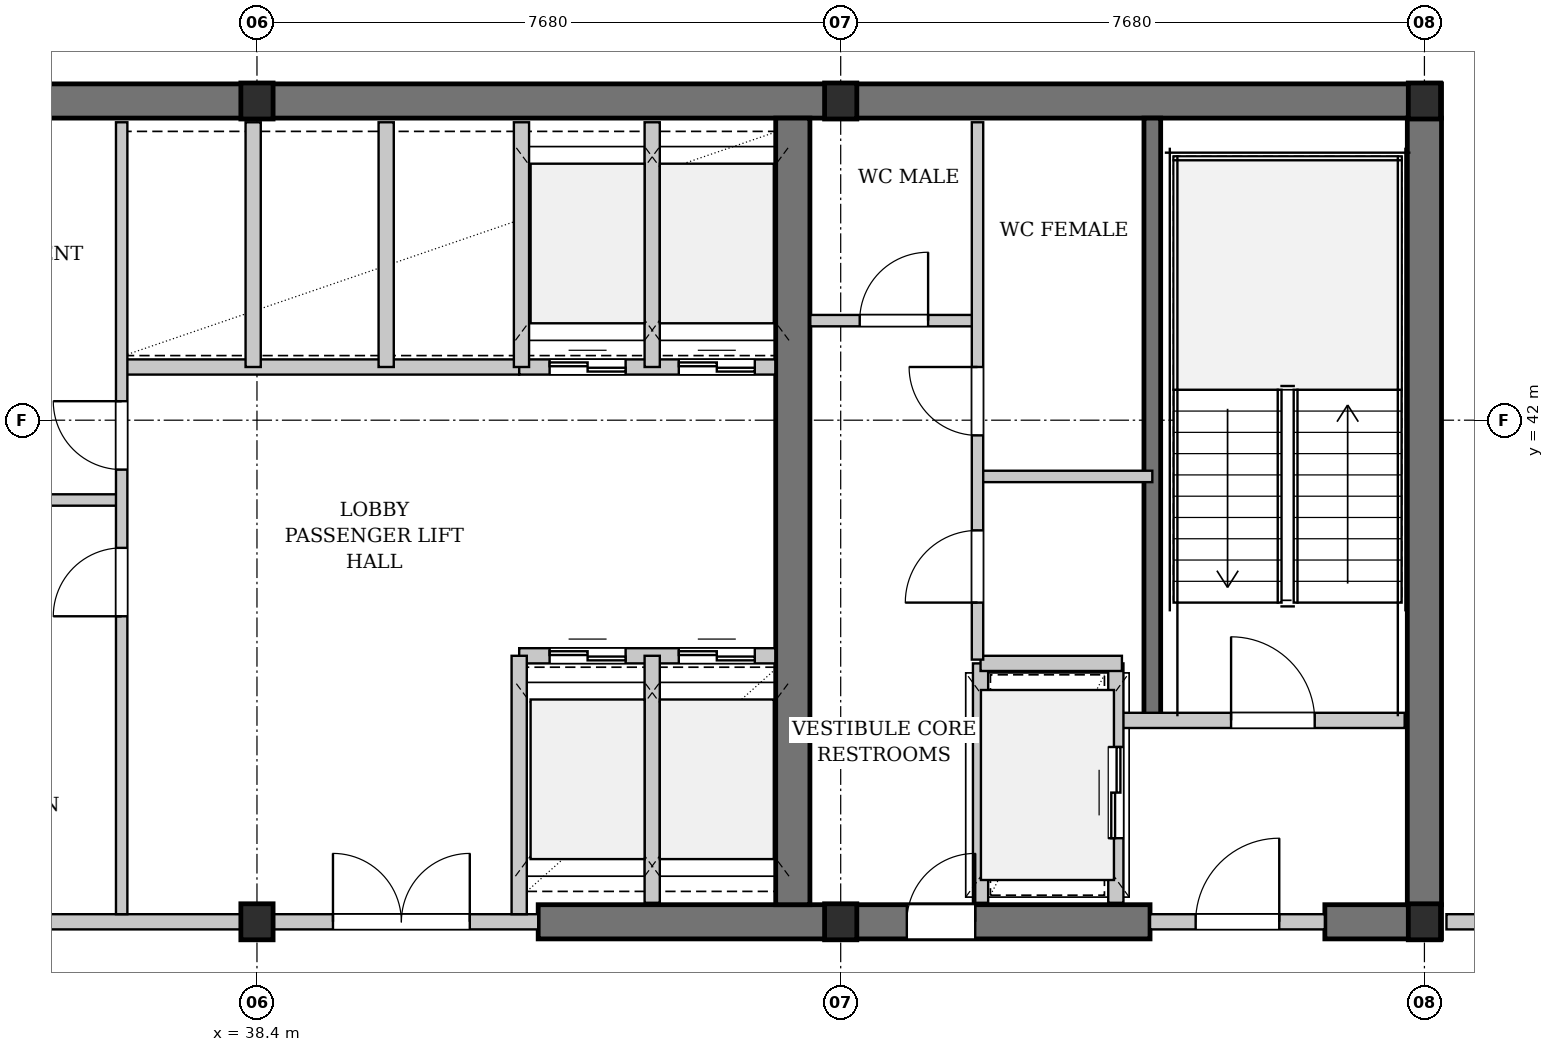
"""IFC4 building model, lengths in metres.
Left out: names, types, materials, properties, quantities, classifications, styles, units other than length and angle.
Written with IfcOpenShell. Run it as: python <this file> out.ifc"""

import sys

from ifc_helpers import new_model, si_unit, direction, frame, frame_2d, origin, origin_2d, place, context, subcontext, project, spatial, rectangle, i_section, extrude, element, fill, save


model = new_model("IFC4")
c1 = context("Model", 3, precision=1e-05, world=origin(), true_north=direction((0.0, 1.0)))
c2 = subcontext(c1, "Body", "Model", "MODEL_VIEW")
j1 = project(units=[si_unit("LENGTHUNIT", "METRE"), si_unit("PLANEANGLEUNIT", "RADIAN")], contexts=[c1])
p1 = place(None, origin())
s1 = spatial("IfcSite", under=j1, at=p1, CompositionType="ELEMENT")
p2 = place(p1, origin())
s2 = spatial("IfcBuilding", under=s1, at=p2, CompositionType="ELEMENT")
p3 = place(p2, frame((0.0, 0.0, 137.3)))
s3 = spatial("IfcBuildingStorey", under=s2, at=p3, CompositionType="ELEMENT", Elevation=137.3)
p4 = place(p3, frame((22.815, 46.2, 0.0), z_axis=(0.0, 0.0, 1.0), x_axis=(1.0, 0.0, 0.0)))
e1 = element("IfcWall", 1, at=p4, inside=s3, PredefinedType="SHEAR", context=c2, shape_type="SweptSolid", body=[
    extrude(rectangle(XDim=31.17, YDim=0.45, at=frame_2d((15.585, 0.0))), origin(), (0.0, 0.0, 1.0), 3.68),
])
p5 = place(p3, frame((42.1, 35.4, 0.0), z_axis=(0.0, 0.0, 1.0), x_axis=(1.0, 0.0, 0.0)))
e2 = element("IfcWall", 2, at=p5, inside=s3, PredefinedType="SHEAR", context=c2, shape_type="SweptSolid", body=[
    extrude(rectangle(XDim=8.05, YDim=0.45, at=frame_2d((4.025, 0.0))), origin(), (0.0, 0.0, 1.0), 3.68),
])
p6 = place(p5, frame((4.85, 0.0, 0.0)))
e3 = element("IfcOpeningElement", 3, at=p6, cuts=e2, PredefinedType="OPENING", context=c2, shape_type="SweptSolid", body=[
    extrude(rectangle(XDim=0.9, YDim=2.15, at=frame_2d((0.45, 1.075))), frame((0.0, 0.235, 0.0), z_axis=(0.0, -1.0, 0.0), x_axis=(1.0, 0.0, 0.0)), (0.0, 0.0, 1.0), 0.47),
])
p7 = place(p3, frame((52.45, 35.4, 0.0), z_axis=(0.0, 0.0, 1.0), x_axis=(1.0, 0.0, 0.0)))
e4 = element("IfcWall", 4, at=p7, inside=s3, PredefinedType="SHEAR", context=c2, shape_type="SweptSolid", body=[
    extrude(rectangle(XDim=1.535, YDim=0.45, at=frame_2d((0.768, 0.0))), origin(), (0.0, 0.0, 1.0), 3.68),
])
for number, where, z_axis, x_axis in (
    (5, (45.45, 35.625, 0.0), (0.0, 0.0, 1.0), (0.0, 1.0, 0.0)),
    (6, (53.76, 35.625, 0.0), (0.0, 0.0, 1.0), (0.0, 1.0, 0.0)),
):
    element("IfcWall", number, at=place(p3, frame(where, z_axis=z_axis, x_axis=x_axis)), inside=s3, PredefinedType="SHEAR", context=c2, shape_type="SweptSolid", body=[
        extrude(rectangle(XDim=10.35, YDim=0.45, at=frame_2d((5.175, 0.0))), origin(), (0.0, 0.0, 1.0), 3.68),
    ])
p8 = place(p3, frame((50.18, 38.05, 0.0), z_axis=(0.0, 0.0, 1.0), x_axis=(0.0, 1.0, 0.0)))
e7 = element("IfcWall", 7, at=p8, inside=s3, PredefinedType="SHEAR", context=c2, shape_type="SweptSolid", body=[
    extrude(rectangle(XDim=7.925, YDim=0.22, at=frame_2d((3.962, 0.0))), origin(), (0.0, 0.0, 1.0), 3.68),
])
for number, where, z_axis, x_axis in (
    (8, (38.4, 35.4, 0.0), (0.0, 0.0, 1.0), (1.0, 0.0, 0.0)),
    (9, (38.4, 46.2, 0.0), (0.0, 0.0, 1.0), (1.0, 0.0, 0.0)),
    (10, (46.08, 35.4, 0.0), (0.0, 0.0, 1.0), (1.0, 0.0, 0.0)),
    (11, (46.08, 46.2, 0.0), (0.0, 0.0, 1.0), (1.0, 0.0, 0.0)),
    (12, (53.76, 35.4, 0.0), (0.0, 0.0, 1.0), (1.0, 0.0, 0.0)),
    (13, (53.76, 46.2, 0.0), (0.0, 0.0, 1.0), (1.0, 0.0, 0.0)),
):
    element("IfcColumn", number, at=place(p3, frame(where, z_axis=z_axis, x_axis=x_axis)), inside=s3, PredefinedType="COLUMN", context=c2, shape_type="SweptSolid", body=[
        extrude(i_section(OverallWidth=0.424, OverallDepth=0.474, WebThickness=0.047, FlangeThickness=0.077, FilletRadius=0.015, at=origin_2d()), origin(), (0.0, 0.0, 1.0), 3.9),
    ])
p9 = place(p3, frame((35.6, 35.4, 0.0), z_axis=(0.0, 0.0, 1.0), x_axis=(1.0, 0.0, 0.0)))
e14 = element("IfcWall", 14, at=p9, inside=s3, PredefinedType="PARTITIONING", context=c2, shape_type="SweptSolid", body=[
    extrude(rectangle(XDim=6.5, YDim=0.2, at=frame_2d((3.25, 0.0))), origin(), (0.0, 0.0, 1.0), 2.765),
])
p10 = place(p9, frame((3.8, 0.0, 0.0)))
e15 = element("IfcOpeningElement", 15, at=p10, cuts=e14, PredefinedType="OPENING", context=c2, shape_type="SweptSolid", body=[
    extrude(rectangle(XDim=1.8, YDim=2.3, at=frame_2d((0.9, 1.15))), frame((0.0, 0.11, 0.0), z_axis=(0.0, -1.0, 0.0), x_axis=(1.0, 0.0, 0.0)), (0.0, 0.0, 1.0), 0.22),
])
p11 = place(p3, frame((36.6, 42.7, 0.0), z_axis=(0.0, 0.0, 1.0), x_axis=(1.0, 0.0, 0.0)))
e16 = element("IfcWall", 16, at=p11, inside=s3, PredefinedType="PARTITIONING", context=c2, shape_type="SweptSolid", body=[
    extrude(rectangle(XDim=5.25, YDim=0.2, at=frame_2d((2.625, 0.0))), origin(), (0.0, 0.0, 1.0), 3.68),
])
p12 = place(p3, frame((38.35, 42.7, 0.0), z_axis=(0.0, 0.0, 1.0), x_axis=(0.0, 1.0, 0.0)))
e17 = element("IfcWall", 17, at=p12, inside=s3, PredefinedType="PARTITIONING", context=c2, shape_type="SweptSolid", body=[
    extrude(rectangle(XDim=3.22, YDim=0.2, at=frame_2d((1.61, 0.0))), origin(), (0.0, 0.0, 1.0), 2.765),
])
p13 = place(p3, frame((40.1, 42.7, 0.0), z_axis=(0.0, 0.0, 1.0), x_axis=(0.0, 1.0, 0.0)))
e18 = element("IfcWall", 18, at=p13, inside=s3, PredefinedType="PARTITIONING", context=c2, shape_type="SweptSolid", body=[
    extrude(rectangle(XDim=3.22, YDim=0.2, at=frame_2d((1.61, 0.0))), origin(), (0.0, 0.0, 1.0), 3.68),
])
p14 = place(p3, frame((33.05, 40.95, 0.0), z_axis=(0.0, 0.0, 1.0), x_axis=(1.0, 0.0, 0.0)))
e19 = element("IfcWall", 19, at=p14, inside=s3, PredefinedType="PARTITIONING", context=c2, shape_type="SweptSolid", body=[
    extrude(rectangle(XDim=3.57, YDim=0.15, at=frame_2d((1.785, 0.0))), origin(), (0.0, 0.0, 1.0), 3.68),
])
p15 = place(p3, frame((36.62, 35.5, 0.0), z_axis=(0.0, 0.0, 1.0), x_axis=(0.0, 1.0, 0.0)))
e20 = element("IfcWall", 20, at=p15, inside=s3, PredefinedType="PARTITIONING", context=c2, shape_type="SweptSolid", body=[
    extrude(rectangle(XDim=10.42, YDim=0.15, at=frame_2d((5.21, 0.0))), origin(), (0.0, 0.0, 1.0), 3.68),
])
p16 = place(p15, frame((3.92, 0.0, 0.0)))
e21 = element("IfcOpeningElement", 21, at=p16, cuts=e20, PredefinedType="OPENING", context=c2, shape_type="SweptSolid", body=[
    extrude(rectangle(XDim=0.9, YDim=2.15, at=frame_2d((0.45, 1.075))), frame((0.0, 0.085, 0.0), z_axis=(0.0, -1.0, 0.0), x_axis=(1.0, 0.0, 0.0)), (0.0, 0.0, 1.0), 0.17),
])
p17 = place(p15, frame((5.85, 0.0, 0.0)))
e22 = element("IfcOpeningElement", 22, at=p17, cuts=e20, PredefinedType="OPENING", context=c2, shape_type="SweptSolid", body=[
    extrude(rectangle(XDim=0.9, YDim=2.15, at=frame_2d((0.45, 1.075))), frame((0.0, 0.085, 0.0), z_axis=(0.0, -1.0, 0.0), x_axis=(1.0, 0.0, 0.0)), (0.0, 0.0, 1.0), 0.17),
])
p18 = place(p3, frame((41.85, 38.9, 0.0), z_axis=(0.0, 0.0, 1.0), x_axis=(1.0, 0.0, 0.0)))
e23 = element("IfcWall", 23, at=p18, inside=s3, PredefinedType="PARTITIONING", context=c2, shape_type="SweptSolid", body=[
    extrude(rectangle(XDim=3.37, YDim=0.2, at=frame_2d((1.685, 0.0))), origin(), (0.0, 0.0, 1.0), 3.68),
])
p19 = place(p18, frame((0.4, 0.0, 0.0)))
e24 = element("IfcOpeningElement", 24, at=p19, cuts=e23, PredefinedType="OPENING", context=c2, shape_type="SweptSolid", body=[
    extrude(rectangle(XDim=1.0, YDim=2.2, at=frame_2d((0.5, 1.1))), frame((0.0, 0.11, 0.0), z_axis=(0.0, -1.0, 0.0), x_axis=(1.0, 0.0, 0.0)), (0.0, 0.0, 1.0), 0.22),
])
p20 = place(p18, frame((2.1, 0.0, 0.0)))
e25 = element("IfcOpeningElement", 25, at=p20, cuts=e23, PredefinedType="OPENING", context=c2, shape_type="SweptSolid", body=[
    extrude(rectangle(XDim=1.0, YDim=2.2, at=frame_2d((0.5, 1.1))), frame((0.0, 0.11, 0.0), z_axis=(0.0, -1.0, 0.0), x_axis=(1.0, 0.0, 0.0)), (0.0, 0.0, 1.0), 0.22),
])
p21 = place(p3, frame((41.85, 42.7, 0.0), z_axis=(0.0, 0.0, 1.0), x_axis=(1.0, 0.0, 0.0)))
e26 = element("IfcWall", 26, at=p21, inside=s3, PredefinedType="PARTITIONING", context=c2, shape_type="SweptSolid", body=[
    extrude(rectangle(XDim=3.37, YDim=0.2, at=frame_2d((1.685, 0.0))), origin(), (0.0, 0.0, 1.0), 3.68),
])
p22 = place(p21, frame((0.4, 0.0, 0.0)))
e27 = element("IfcOpeningElement", 27, at=p22, cuts=e26, PredefinedType="OPENING", context=c2, shape_type="SweptSolid", body=[
    extrude(rectangle(XDim=1.0, YDim=2.2, at=frame_2d((0.5, 1.1))), frame((0.0, 0.11, 0.0), z_axis=(0.0, -1.0, 0.0), x_axis=(1.0, 0.0, 0.0)), (0.0, 0.0, 1.0), 0.22),
])
p23 = place(p21, frame((2.1, 0.0, 0.0)))
e28 = element("IfcOpeningElement", 28, at=p23, cuts=e26, PredefinedType="OPENING", context=c2, shape_type="SweptSolid", body=[
    extrude(rectangle(XDim=1.0, YDim=2.2, at=frame_2d((0.5, 1.1))), frame((0.0, 0.11, 0.0), z_axis=(0.0, -1.0, 0.0), x_axis=(1.0, 0.0, 0.0)), (0.0, 0.0, 1.0), 0.22),
])
p24 = place(p3, frame((43.6, 35.65, 0.0), z_axis=(0.0, 0.0, 1.0), x_axis=(0.0, 1.0, 0.0)))
e29 = element("IfcWall", 29, at=p24, inside=s3, PredefinedType="PARTITIONING", context=c2, shape_type="SweptSolid", body=[
    extrude(rectangle(XDim=3.25, YDim=0.2, at=frame_2d((1.625, 0.0))), origin(), (0.0, 0.0, 1.0), 3.68),
])
p25 = place(p3, frame((43.6, 42.7, 0.0), z_axis=(0.0, 0.0, 1.0), x_axis=(0.0, 1.0, 0.0)))
e30 = element("IfcWall", 30, at=p25, inside=s3, PredefinedType="PARTITIONING", context=c2, shape_type="SweptSolid", body=[
    extrude(rectangle(XDim=3.22, YDim=0.2, at=frame_2d((1.61, 0.0))), origin(), (0.0, 0.0, 1.0), 3.68),
])
p26 = place(p3, frame((41.85, 35.5, 0.0), z_axis=(0.0, 0.0, 1.0), x_axis=(0.0, 1.0, 0.0)))
e31 = element("IfcWall", 31, at=p26, inside=s3, PredefinedType="PARTITIONING", context=c2, shape_type="SweptSolid", body=[
    extrude(rectangle(XDim=3.4, YDim=0.2, at=frame_2d((1.7, 0.0))), origin(), (0.0, 0.0, 1.0), 3.68),
])
p27 = place(p3, frame((41.88, 42.7, 0.0), z_axis=(0.0, 0.0, 1.0), x_axis=(0.0, 1.0, 0.0)))
e32 = element("IfcWall", 32, at=p27, inside=s3, PredefinedType="PARTITIONING", context=c2, shape_type="SweptSolid", body=[
    extrude(rectangle(XDim=3.22, YDim=0.2, at=frame_2d((1.61, 0.0))), origin(), (0.0, 0.0, 1.0), 3.68),
])
p28 = place(p3, frame((49.78, 38.05, 0.0), z_axis=(0.0, 0.0, 1.0), x_axis=(1.0, 0.0, 0.0)))
e33 = element("IfcWall", 33, at=p28, inside=s3, PredefinedType="PARTITIONING", context=c2, shape_type="SweptSolid", body=[
    extrude(rectangle(XDim=3.72, YDim=0.2, at=frame_2d((1.86, 0.0))), origin(), (0.0, 0.0, 1.0), 3.68),
])
p29 = place(p28, frame((1.436, 0.0, 0.0)))
e34 = element("IfcOpeningElement", 34, at=p29, cuts=e33, PredefinedType="OPENING", context=c2, shape_type="SweptSolid", body=[
    extrude(rectangle(XDim=1.1, YDim=2.15, at=frame_2d((0.55, 1.075))), frame((0.0, 0.11, 0.0), z_axis=(0.0, -1.0, 0.0), x_axis=(1.0, 0.0, 0.0)), (0.0, 0.0, 1.0), 0.22),
])
p30 = place(p3, frame((50.15, 35.4, 0.0), z_axis=(0.0, 0.0, 1.0), x_axis=(1.0, 0.0, 0.0)))
e35 = element("IfcWall", 35, at=p30, inside=s3, PredefinedType="PARTITIONING", context=c2, shape_type="SweptSolid", body=[
    extrude(rectangle(XDim=2.3, YDim=0.2, at=frame_2d((1.15, 0.0))), origin(), (0.0, 0.0, 1.0), 2.765),
])
p31 = place(p30, frame((0.6, 0.0, 0.0)))
e36 = element("IfcOpeningElement", 36, at=p31, cuts=e35, PredefinedType="OPENING", context=c2, shape_type="SweptSolid", body=[
    extrude(rectangle(XDim=1.1, YDim=2.15, at=frame_2d((0.55, 1.075))), frame((0.0, 0.11, 0.0), z_axis=(0.0, -1.0, 0.0), x_axis=(1.0, 0.0, 0.0)), (0.0, 0.0, 1.0), 0.22),
])
p32 = place(p3, frame((49.7, 35.65, 0.0), z_axis=(0.0, 0.0, 1.0), x_axis=(0.0, 1.0, 0.0)))
e37 = element("IfcWall", 37, at=p32, inside=s3, PredefinedType="PARTITIONING", context=c2, shape_type="SweptSolid", body=[
    extrude(rectangle(XDim=3.15, YDim=0.2, at=frame_2d((1.575, 0.0))), origin(), (0.0, 0.0, 1.0), 3.68),
])
p33 = place(p32, frame((0.85, 0.0, 0.0)))
e38 = element("IfcOpeningElement", 38, at=p33, cuts=e37, PredefinedType="OPENING", context=c2, shape_type="SweptSolid", body=[
    extrude(rectangle(XDim=1.2, YDim=2.2, at=frame_2d((0.6, 1.1))), frame((0.0, 0.11, 0.0), z_axis=(0.0, -1.0, 0.0), x_axis=(1.0, 0.0, 0.0)), (0.0, 0.0, 1.0), 0.22),
])
p34 = place(p3, frame((47.92, 35.65, 0.0), z_axis=(0.0, 0.0, 1.0), x_axis=(0.0, 1.0, 0.0)))
e39 = element("IfcWall", 39, at=p34, inside=s3, PredefinedType="PARTITIONING", context=c2, shape_type="SweptSolid", body=[
    extrude(rectangle(XDim=3.15, YDim=0.2, at=frame_2d((1.575, 0.0))), origin(), (0.0, 0.0, 1.0), 3.68),
])
p35 = place(p3, frame((47.92, 38.8, 0.0), z_axis=(0.0, 0.0, 1.0), x_axis=(1.0, 0.0, 0.0)))
e40 = element("IfcWall", 40, at=p35, inside=s3, PredefinedType="PARTITIONING", context=c2, shape_type="SweptSolid", body=[
    extrude(rectangle(XDim=1.86, YDim=0.2, at=frame_2d((0.93, 0.0))), origin(), (0.0, 0.0, 1.0), 3.68),
])
p36 = place(p3, frame((45.68, 43.31, 0.0), z_axis=(0.0, 0.0, 1.0), x_axis=(1.0, 0.0, 0.0)))
e41 = element("IfcWall", 41, at=p36, inside=s3, PredefinedType="PARTITIONING", context=c2, shape_type="SweptSolid", body=[
    extrude(rectangle(XDim=2.2, YDim=0.15, at=frame_2d((1.1, 0.0))), origin(), (0.0, 0.0, 1.0), 3.68),
])
p37 = place(p36, frame((0.65, 0.0, 0.0)))
e42 = element("IfcOpeningElement", 42, at=p37, cuts=e41, PredefinedType="OPENING", context=c2, shape_type="SweptSolid", body=[
    extrude(rectangle(XDim=0.9, YDim=2.15, at=frame_2d((0.45, 1.075))), frame((0.0, 0.085, 0.0), z_axis=(0.0, -1.0, 0.0), x_axis=(1.0, 0.0, 0.0)), (0.0, 0.0, 1.0), 0.17),
])
p38 = place(p3, frame((47.88, 41.26, 0.0), z_axis=(0.0, 0.0, 1.0), x_axis=(1.0, 0.0, 0.0)))
e43 = element("IfcWall", 43, at=p38, inside=s3, PredefinedType="PARTITIONING", context=c2, shape_type="SweptSolid", body=[
    extrude(rectangle(XDim=2.3, YDim=0.15, at=frame_2d((1.15, 0.0))), origin(), (0.0, 0.0, 1.0), 3.68),
])
p39 = place(p3, frame((47.88, 38.85, 0.0), z_axis=(0.0, 0.0, 1.0), x_axis=(0.0, 1.0, 0.0)))
e44 = element("IfcWall", 44, at=p39, inside=s3, PredefinedType="PARTITIONING", context=c2, shape_type="SweptSolid", body=[
    extrude(rectangle(XDim=7.07, YDim=0.15, at=frame_2d((3.535, 0.0))), origin(), (0.0, 0.0, 1.0), 3.68),
])
p40 = place(p39, frame((0.75, 0.0, 0.0)))
e45 = element("IfcOpeningElement", 45, at=p40, cuts=e44, PredefinedType="OPENING", context=c2, shape_type="SweptSolid", body=[
    extrude(rectangle(XDim=0.95, YDim=2.15, at=frame_2d((0.475, 1.075))), frame((0.0, 0.085, 0.0), z_axis=(0.0, -1.0, 0.0), x_axis=(1.0, 0.0, 0.0)), (0.0, 0.0, 1.0), 0.17),
])
p41 = place(p39, frame((2.95, 0.0, 0.0)))
e46 = element("IfcOpeningElement", 46, at=p41, cuts=e44, PredefinedType="OPENING", context=c2, shape_type="SweptSolid", body=[
    extrude(rectangle(XDim=0.9, YDim=2.15, at=frame_2d((0.45, 1.075))), frame((0.0, 0.085, 0.0), z_axis=(0.0, -1.0, 0.0), x_axis=(1.0, 0.0, 0.0)), (0.0, 0.0, 1.0), 0.17),
])
p42 = place(p3, frame((54.05, 35.4, 0.0), z_axis=(0.0, 0.0, 1.0), x_axis=(1.0, 0.0, 0.0)))
e47 = element("IfcWall", 47, at=p42, inside=s3, PredefinedType="PARTITIONING", context=c2, shape_type="SweptSolid", body=[
    extrude(rectangle(XDim=5.0, YDim=0.2, at=frame_2d((2.5, 0.0))), origin(), (0.0, 0.0, 1.0), 3.68),
])
p43 = place(p42, frame((1.95, 0.0, 0.0)))
e48 = element("IfcOpeningElement", 48, at=p43, cuts=e47, PredefinedType="OPENING", context=c2, shape_type="SweptSolid", body=[
    extrude(rectangle(XDim=1.1, YDim=2.15, at=frame_2d((0.55, 1.075))), frame((0.0, 0.11, 0.0), z_axis=(0.0, -1.0, 0.0), x_axis=(1.0, 0.0, 0.0)), (0.0, 0.0, 1.0), 0.22),
])
p44 = place(p10, origin())
e49 = element("IfcDoor", 49, at=p44, inside=s3, OperationType="DOUBLE_DOOR_SINGLE_SWING", PredefinedType="DOOR", context=c2, shape_type="SweptSolid", body=[
    extrude(rectangle(XDim=1.8, YDim=2.3, at=frame_2d((0.9, 1.15))), frame((0.0, 0.025, 0.0), z_axis=(0.0, -1.0, 0.0), x_axis=(1.0, 0.0, 0.0)), (0.0, 0.0, 1.0), 0.05),
])
fill(e15, e49)
p45 = place(p16, origin())
e50 = element("IfcDoor", 50, at=p45, inside=s3, OperationType="SINGLE_SWING_LEFT", PredefinedType="DOOR", context=c2, shape_type="SweptSolid", body=[
    extrude(rectangle(XDim=0.9, YDim=2.15, at=frame_2d((0.45, 1.075))), frame((0.0, 0.025, 0.0), z_axis=(0.0, -1.0, 0.0), x_axis=(1.0, 0.0, 0.0)), (0.0, 0.0, 1.0), 0.05),
])
fill(e21, e50)
p46 = place(p17, origin())
e51 = element("IfcDoor", 51, at=p46, inside=s3, OperationType="SINGLE_SWING_RIGHT", PredefinedType="DOOR", context=c2, shape_type="SweptSolid", body=[
    extrude(rectangle(XDim=0.9, YDim=2.15, at=frame_2d((0.45, 1.075))), frame((0.0, 0.025, 0.0), z_axis=(0.0, -1.0, 0.0), x_axis=(1.0, 0.0, 0.0)), (0.0, 0.0, 1.0), 0.05),
])
fill(e22, e51)
p47 = place(p19, origin())
e52 = element("IfcDoor", 52, at=p47, inside=s3, OperationType="DOUBLE_DOOR_SLIDING", PredefinedType="DOOR", context=c2, shape_type="SweptSolid", body=[
    extrude(rectangle(XDim=1.0, YDim=2.2, at=frame_2d((0.5, 1.1))), frame((0.0, 0.025, 0.0), z_axis=(0.0, -1.0, 0.0), x_axis=(1.0, 0.0, 0.0)), (0.0, 0.0, 1.0), 0.05),
])
fill(e24, e52)
p48 = place(p20, origin())
e53 = element("IfcDoor", 53, at=p48, inside=s3, OperationType="DOUBLE_DOOR_SLIDING", PredefinedType="DOOR", context=c2, shape_type="SweptSolid", body=[
    extrude(rectangle(XDim=1.0, YDim=2.2, at=frame_2d((0.5, 1.1))), frame((0.0, 0.025, 0.0), z_axis=(0.0, -1.0, 0.0), x_axis=(1.0, 0.0, 0.0)), (0.0, 0.0, 1.0), 0.05),
])
fill(e25, e53)
p49 = place(p22, origin())
e54 = element("IfcDoor", 54, at=p49, inside=s3, OperationType="DOUBLE_DOOR_SLIDING", PredefinedType="DOOR", context=c2, shape_type="SweptSolid", body=[
    extrude(rectangle(XDim=1.0, YDim=2.2, at=frame_2d((0.5, 1.1))), frame((0.0, 0.025, 0.0), z_axis=(0.0, -1.0, 0.0), x_axis=(1.0, 0.0, 0.0)), (0.0, 0.0, 1.0), 0.05),
])
fill(e27, e54)
p50 = place(p23, origin())
e55 = element("IfcDoor", 55, at=p50, inside=s3, OperationType="DOUBLE_DOOR_SLIDING", PredefinedType="DOOR", context=c2, shape_type="SweptSolid", body=[
    extrude(rectangle(XDim=1.0, YDim=2.2, at=frame_2d((0.5, 1.1))), frame((0.0, 0.025, 0.0), z_axis=(0.0, -1.0, 0.0), x_axis=(1.0, 0.0, 0.0)), (0.0, 0.0, 1.0), 0.05),
])
fill(e28, e55)
p51 = place(p29, origin())
e56 = element("IfcDoor", 56, at=p51, inside=s3, OperationType="SINGLE_SWING_LEFT", PredefinedType="DOOR", context=c2, shape_type="SweptSolid", body=[
    extrude(rectangle(XDim=1.1, YDim=2.15, at=frame_2d((0.55, 1.075))), frame((0.0, 0.025, 0.0), z_axis=(0.0, -1.0, 0.0), x_axis=(1.0, 0.0, 0.0)), (0.0, 0.0, 1.0), 0.05),
])
fill(e34, e56)
p52 = place(p31, origin())
e57 = element("IfcDoor", 57, at=p52, inside=s3, OperationType="SINGLE_SWING_RIGHT", PredefinedType="DOOR", context=c2, shape_type="SweptSolid", body=[
    extrude(rectangle(XDim=1.1, YDim=2.15, at=frame_2d((0.55, 1.075))), frame((0.0, 0.025, 0.0), z_axis=(0.0, -1.0, 0.0), x_axis=(1.0, 0.0, 0.0)), (0.0, 0.0, 1.0), 0.05),
])
fill(e36, e57)
p53 = place(p33, origin())
e58 = element("IfcDoor", 58, at=p53, inside=s3, OperationType="DOUBLE_DOOR_SLIDING", PredefinedType="DOOR", context=c2, shape_type="SweptSolid", body=[
    extrude(rectangle(XDim=1.2, YDim=2.2, at=frame_2d((0.6, 1.1))), frame((0.0, 0.025, 0.0), z_axis=(0.0, -1.0, 0.0), x_axis=(1.0, 0.0, 0.0)), (0.0, 0.0, 1.0), 0.05),
])
fill(e38, e58)
p54 = place(p37, origin())
e59 = element("IfcDoor", 59, at=p54, inside=s3, OperationType="SINGLE_SWING_RIGHT", PredefinedType="DOOR", context=c2, shape_type="SweptSolid", body=[
    extrude(rectangle(XDim=0.9, YDim=2.15, at=frame_2d((0.45, 1.075))), frame((0.0, 0.025, 0.0), z_axis=(0.0, -1.0, 0.0), x_axis=(1.0, 0.0, 0.0)), (0.0, 0.0, 1.0), 0.05),
])
fill(e42, e59)
p55 = place(p40, origin())
e60 = element("IfcDoor", 60, at=p55, inside=s3, OperationType="SINGLE_SWING_LEFT", PredefinedType="DOOR", context=c2, shape_type="SweptSolid", body=[
    extrude(rectangle(XDim=0.95, YDim=2.15, at=frame_2d((0.475, 1.075))), frame((0.0, 0.025, 0.0), z_axis=(0.0, -1.0, 0.0), x_axis=(1.0, 0.0, 0.0)), (0.0, 0.0, 1.0), 0.05),
])
fill(e45, e60)
p56 = place(p41, origin())
e61 = element("IfcDoor", 61, at=p56, inside=s3, OperationType="SINGLE_SWING_RIGHT", PredefinedType="DOOR", context=c2, shape_type="SweptSolid", body=[
    extrude(rectangle(XDim=0.9, YDim=2.15, at=frame_2d((0.45, 1.075))), frame((0.0, 0.025, 0.0), z_axis=(0.0, -1.0, 0.0), x_axis=(1.0, 0.0, 0.0)), (0.0, 0.0, 1.0), 0.05),
])
fill(e46, e61)
p57 = place(p6, origin())
e62 = element("IfcDoor", 62, at=p57, inside=s3, OperationType="SINGLE_SWING_RIGHT", PredefinedType="DOOR", context=c2, shape_type="SweptSolid", body=[
    extrude(rectangle(XDim=0.9, YDim=2.15, at=frame_2d((0.45, 1.075))), frame((0.0, 0.025, 0.0), z_axis=(0.0, -1.0, 0.0), x_axis=(1.0, 0.0, 0.0)), (0.0, 0.0, 1.0), 0.05),
])
fill(e3, e62)
save(model, sys.argv[1])
